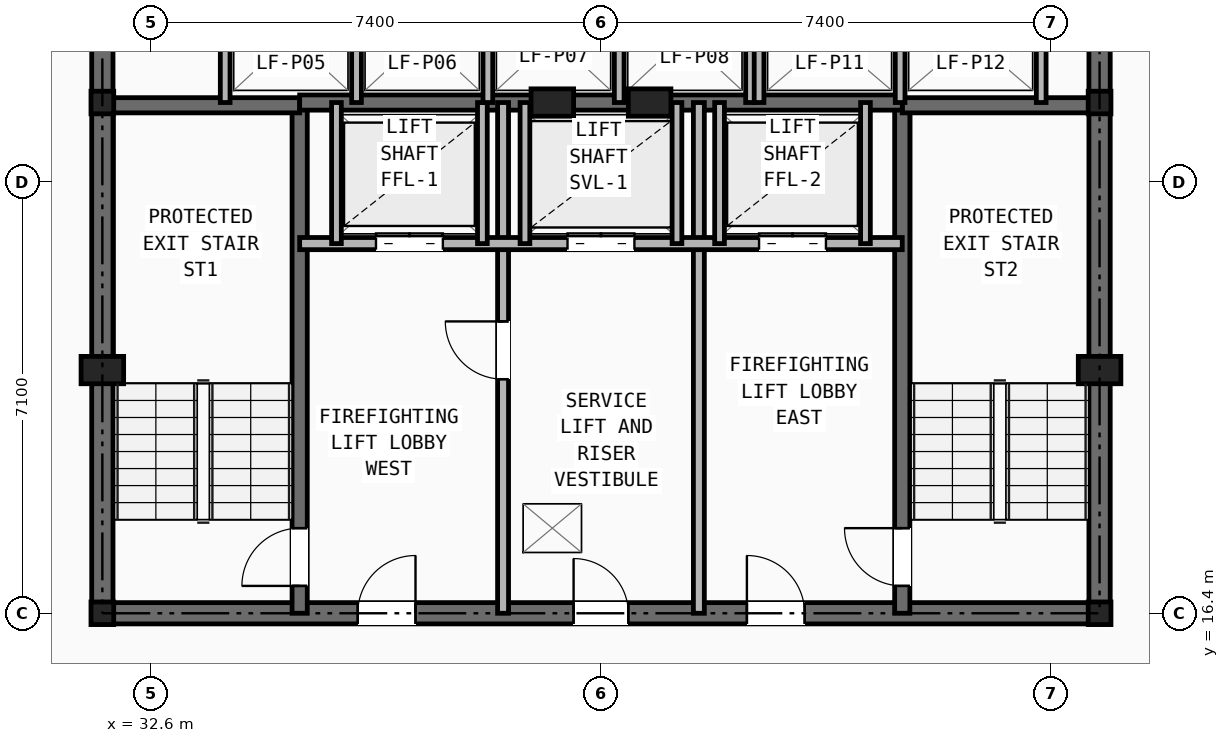
"""IFC4 building model, lengths in metres.
Left out: names, types, materials, properties, quantities, classifications, styles, units other than length and angle.
Written with IfcOpenShell. Run it as: python <this file> out.ifc"""

import sys

from ifc_helpers import new_model, si_unit, direction, frame, frame_2d, origin, origin_2d, place, context, subcontext, project, spatial, rectangle, i_section, extrude, element, fill, save


model = new_model("IFC4")
c1 = context("Model", 3, precision=1e-05, world=origin(), true_north=direction((0.0, 1.0)))
c2 = subcontext(c1, "Body", "Model", "MODEL_VIEW")
j1 = project(units=[si_unit("LENGTHUNIT", "METRE"), si_unit("PLANEANGLEUNIT", "RADIAN")], contexts=[c1])
p1 = place(None, origin())
s1 = spatial("IfcSite", under=j1, at=p1, CompositionType="ELEMENT")
p2 = place(p1, origin())
s2 = spatial("IfcBuilding", under=s1, at=p2, CompositionType="ELEMENT")
p3 = place(p2, frame((0.0, 0.0, 40.0)))
s3 = spatial("IfcBuildingStorey", under=s2, at=p3, CompositionType="ELEMENT", Elevation=40.0)
for number, where, z_axis, x_axis in (
    (1, (31.8, 16.4, 0.0), (0.0, 0.0, 1.0), (1.0, 0.0, 0.0)),
    (2, (48.2, 16.4, 0.0), (0.0, 0.0, 1.0), (1.0, 0.0, 0.0)),
    (3, (31.8, 24.8, 0.0), (0.0, 0.0, 1.0), (1.0, 0.0, 0.0)),
    (4, (48.2, 24.8, 0.0), (0.0, 0.0, 1.0), (1.0, 0.0, 0.0)),
):
    element("IfcColumn", number, at=place(p3, frame(where, z_axis=z_axis, x_axis=x_axis)), inside=s3, PredefinedType="COLUMN", context=c2, shape_type="SweptSolid", body=[
        extrude(i_section(OverallWidth=0.374, OverallDepth=0.372, WebThickness=0.016, FlangeThickness=0.026, at=origin_2d()), origin(), (0.0, 0.0, 1.0), 3.2),
    ])
for number, where, z_axis, x_axis in (
    (5, (31.8, 20.4, 0.0), (0.0, 0.0, 1.0), (1.0, 0.0, 0.0)),
    (6, (48.2, 20.4, 0.0), (0.0, 0.0, 1.0), (1.0, 0.0, 0.0)),
    (7, (39.2, 24.8, 0.0), (0.0, 0.0, 1.0), (1.0, 0.0, 0.0)),
    (8, (40.8, 24.8, 0.0), (0.0, 0.0, 1.0), (1.0, 0.0, 0.0)),
):
    element("IfcColumn", number, at=place(p3, frame(where, z_axis=z_axis, x_axis=x_axis)), inside=s3, PredefinedType="PILASTER", context=c2, shape_type="SweptSolid", body=[
        extrude(rectangle(XDim=0.7, YDim=0.45, at=origin_2d()), origin(), (0.0, 0.0, 1.0), 3.2),
    ])
p4 = place(p3, frame((31.8, 16.4, 0.0), z_axis=(0.0, 0.0, 1.0), x_axis=(1.0, 0.0, 0.0)))
e9 = element("IfcWall", 9, at=p4, inside=s3, PredefinedType="SHEAR", context=c2, shape_type="SweptSolid", body=[
    extrude(rectangle(XDim=16.4, YDim=0.35, at=frame_2d((8.2, 0.0))), origin(), (0.0, 0.0, 1.0), 2.98),
])
p5 = place(p4, frame((7.75, 0.0, 0.0)))
e10 = element("IfcOpeningElement", 10, at=p5, cuts=e9, PredefinedType="OPENING", context=c2, shape_type="SweptSolid", body=[
    extrude(rectangle(XDim=0.9, YDim=2.1, at=frame_2d((0.45, 1.05))), frame((0.0, 0.185, 0.0), z_axis=(0.0, -1.0, 0.0), x_axis=(1.0, 0.0, 0.0)), (0.0, 0.0, 1.0), 0.37),
])
p6 = place(p4, frame((4.2, 0.0, 0.0)))
e11 = element("IfcOpeningElement", 11, at=p6, cuts=e9, PredefinedType="OPENING", context=c2, shape_type="SweptSolid", body=[
    extrude(rectangle(XDim=0.95, YDim=2.1, at=frame_2d((0.475, 1.05))), frame((0.0, 0.185, 0.0), z_axis=(0.0, -1.0, 0.0), x_axis=(1.0, 0.0, 0.0)), (0.0, 0.0, 1.0), 0.37),
])
p7 = place(p4, frame((10.6, 0.0, 0.0)))
e12 = element("IfcOpeningElement", 12, at=p7, cuts=e9, PredefinedType="OPENING", context=c2, shape_type="SweptSolid", body=[
    extrude(rectangle(XDim=0.95, YDim=2.1, at=frame_2d((0.475, 1.05))), frame((0.0, 0.185, 0.0), z_axis=(0.0, -1.0, 0.0), x_axis=(1.0, 0.0, 0.0)), (0.0, 0.0, 1.0), 0.37),
])
p8 = place(p3, frame((31.8, 16.4, 0.0), z_axis=(0.0, 0.0, 1.0), x_axis=(0.0, 1.0, 0.0)))
e13 = element("IfcWall", 13, at=p8, inside=s3, PredefinedType="SHEAR", context=c2, shape_type="SweptSolid", body=[
    extrude(rectangle(XDim=14.8, YDim=0.35, at=frame_2d((7.4, 0.0))), origin(), (0.0, 0.0, 1.0), 2.98),
])
p9 = place(p8, frame((11.0, 0.0, 0.0)))
e14 = element("IfcOpeningElement", 14, at=p9, cuts=e13, PredefinedType="OPENING", context=c2, shape_type="SweptSolid", body=[
    extrude(rectangle(XDim=1.1, YDim=2.15, at=frame_2d((0.55, 1.075))), frame((0.0, 0.185, 0.0), z_axis=(0.0, -1.0, 0.0), x_axis=(1.0, 0.0, 0.0)), (0.0, 0.0, 1.0), 0.37),
])
p10 = place(p3, frame((48.2, 16.4, 0.0), z_axis=(0.0, 0.0, 1.0), x_axis=(0.0, 1.0, 0.0)))
e15 = element("IfcWall", 15, at=p10, inside=s3, PredefinedType="SHEAR", context=c2, shape_type="SweptSolid", body=[
    extrude(rectangle(XDim=14.8, YDim=0.35, at=frame_2d((7.4, 0.0))), origin(), (0.0, 0.0, 1.0), 2.98),
])
p11 = place(p10, frame((11.0, 0.0, 0.0)))
e16 = element("IfcOpeningElement", 16, at=p11, cuts=e15, PredefinedType="OPENING", context=c2, shape_type="SweptSolid", body=[
    extrude(rectangle(XDim=1.1, YDim=2.15, at=frame_2d((0.55, 1.075))), frame((0.0, 0.185, 0.0), z_axis=(0.0, -1.0, 0.0), x_axis=(1.0, 0.0, 0.0)), (0.0, 0.0, 1.0), 0.37),
])
p12 = place(p3, frame((35.045, 16.4, 0.0), z_axis=(0.0, 0.0, 1.0), x_axis=(0.0, 1.0, 0.0)))
e17 = element("IfcWall", 17, at=p12, inside=s3, PredefinedType="SHEAR", context=c2, shape_type="SweptSolid", body=[
    extrude(rectangle(XDim=8.4, YDim=0.25, at=frame_2d((4.2, 0.0))), origin(), (0.0, 0.0, 1.0), 2.98),
])
p13 = place(p12, frame((0.45, 0.0, 0.0)))
e18 = element("IfcOpeningElement", 18, at=p13, cuts=e17, PredefinedType="OPENING", context=c2, shape_type="SweptSolid", body=[
    extrude(rectangle(XDim=0.95, YDim=2.1, at=frame_2d((0.475, 1.05))), frame((0.0, 0.135, 0.0), z_axis=(0.0, -1.0, 0.0), x_axis=(1.0, 0.0, 0.0)), (0.0, 0.0, 1.0), 0.27),
])
p14 = place(p3, frame((31.8, 24.755, 0.0), z_axis=(0.0, 0.0, 1.0), x_axis=(1.0, 0.0, 0.0)))
e19 = element("IfcWall", 19, at=p14, inside=s3, PredefinedType="SHEAR", context=c2, shape_type="SweptSolid", body=[
    extrude(rectangle(XDim=3.245, YDim=0.25, at=frame_2d((1.623, 0.0))), origin(), (0.0, 0.0, 1.0), 2.98),
])
p15 = place(p3, frame((44.955, 16.4, 0.0), z_axis=(0.0, 0.0, 1.0), x_axis=(0.0, 1.0, 0.0)))
e20 = element("IfcWall", 20, at=p15, inside=s3, PredefinedType="SHEAR", context=c2, shape_type="SweptSolid", body=[
    extrude(rectangle(XDim=8.4, YDim=0.25, at=frame_2d((4.2, 0.0))), origin(), (0.0, 0.0, 1.0), 2.98),
])
p16 = place(p15, frame((0.45, 0.0, 0.0)))
e21 = element("IfcOpeningElement", 21, at=p16, cuts=e20, PredefinedType="OPENING", context=c2, shape_type="SweptSolid", body=[
    extrude(rectangle(XDim=0.95, YDim=2.1, at=frame_2d((0.475, 1.05))), frame((0.0, 0.135, 0.0), z_axis=(0.0, -1.0, 0.0), x_axis=(1.0, 0.0, 0.0)), (0.0, 0.0, 1.0), 0.27),
])
p17 = place(p3, frame((44.955, 24.755, 0.0), z_axis=(0.0, 0.0, 1.0), x_axis=(1.0, 0.0, 0.0)))
e22 = element("IfcWall", 22, at=p17, inside=s3, PredefinedType="SHEAR", context=c2, shape_type="SweptSolid", body=[
    extrude(rectangle(XDim=3.245, YDim=0.25, at=frame_2d((1.623, 0.0))), origin(), (0.0, 0.0, 1.0), 2.98),
])
p18 = place(p3, frame((35.045, 24.8, 0.0), z_axis=(0.0, 0.0, 1.0), x_axis=(1.0, 0.0, 0.0)))
e23 = element("IfcWall", 23, at=p18, inside=s3, PredefinedType="SHEAR", context=c2, shape_type="SweptSolid", body=[
    extrude(rectangle(XDim=9.91, YDim=0.25, at=frame_2d((4.955, 0.0))), origin(), (0.0, 0.0, 1.0), 2.98),
])
p19 = place(p3, frame((38.39, 16.4, 0.0), z_axis=(0.0, 0.0, 1.0), x_axis=(0.0, 1.0, 0.0)))
e24 = element("IfcWall", 24, at=p19, inside=s3, PredefinedType="PARTITIONING", context=c2, shape_type="SweptSolid", body=[
    extrude(rectangle(XDim=8.4, YDim=0.18, at=frame_2d((4.2, 0.0))), origin(), (0.0, 0.0, 1.0), 2.708),
])
p20 = place(p19, frame((3.85, 0.0, 0.0)))
e25 = element("IfcOpeningElement", 25, at=p20, cuts=e24, PredefinedType="OPENING", context=c2, shape_type="SweptSolid", body=[
    extrude(rectangle(XDim=0.95, YDim=2.1, at=frame_2d((0.475, 1.05))), frame((0.0, 0.1, 0.0), z_axis=(0.0, -1.0, 0.0), x_axis=(1.0, 0.0, 0.0)), (0.0, 0.0, 1.0), 0.2),
])
p21 = place(p3, frame((41.61, 16.4, 0.0), z_axis=(0.0, 0.0, 1.0), x_axis=(0.0, 1.0, 0.0)))
e26 = element("IfcWall", 26, at=p21, inside=s3, PredefinedType="PARTITIONING", context=c2, shape_type="SweptSolid", body=[
    extrude(rectangle(XDim=8.4, YDim=0.18, at=frame_2d((4.2, 0.0))), origin(), (0.0, 0.0, 1.0), 2.708),
])
p22 = place(p3, frame((35.045, 22.48, 0.0), z_axis=(0.0, 0.0, 1.0), x_axis=(1.0, 0.0, 0.0)))
e27 = element("IfcWall", 27, at=p22, inside=s3, PredefinedType="SOLIDWALL", context=c2, shape_type="SweptSolid", body=[
    extrude(rectangle(XDim=9.91, YDim=0.2, at=frame_2d((4.955, 0.0))), origin(), (0.0, 0.0, 1.0), 2.98),
])
p23 = place(p22, frame((1.255, 0.0, 0.0)))
e28 = element("IfcOpeningElement", 28, at=p23, cuts=e27, PredefinedType="OPENING", context=c2, shape_type="SweptSolid", body=[
    extrude(rectangle(XDim=1.1, YDim=2.15, at=frame_2d((0.55, 1.075))), frame((0.0, 0.11, 0.0), z_axis=(0.0, -1.0, 0.0), x_axis=(1.0, 0.0, 0.0)), (0.0, 0.0, 1.0), 0.22),
])
p24 = place(p22, frame((7.555, 0.0, 0.0)))
e29 = element("IfcOpeningElement", 29, at=p24, cuts=e27, PredefinedType="OPENING", context=c2, shape_type="SweptSolid", body=[
    extrude(rectangle(XDim=1.1, YDim=2.15, at=frame_2d((0.55, 1.075))), frame((0.0, 0.11, 0.0), z_axis=(0.0, -1.0, 0.0), x_axis=(1.0, 0.0, 0.0)), (0.0, 0.0, 1.0), 0.22),
])
p25 = place(p22, frame((4.405, 0.0, 0.0)))
e30 = element("IfcOpeningElement", 30, at=p25, cuts=e27, PredefinedType="OPENING", context=c2, shape_type="SweptSolid", body=[
    extrude(rectangle(XDim=1.1, YDim=2.15, at=frame_2d((0.55, 1.075))), frame((0.0, 0.11, 0.0), z_axis=(0.0, -1.0, 0.0), x_axis=(1.0, 0.0, 0.0)), (0.0, 0.0, 1.0), 0.22),
])
for number, where, z_axis, x_axis in (
    (31, (35.65, 22.48, 0.0), (0.0, 0.0, 1.0), (0.0, 1.0, 0.0)),
    (32, (38.05, 22.48, 0.0), (0.0, 0.0, 1.0), (0.0, 1.0, 0.0)),
    (33, (41.95, 22.48, 0.0), (0.0, 0.0, 1.0), (0.0, 1.0, 0.0)),
    (34, (44.35, 22.48, 0.0), (0.0, 0.0, 1.0), (0.0, 1.0, 0.0)),
    (35, (38.75, 22.48, 0.0), (0.0, 0.0, 1.0), (0.0, 1.0, 0.0)),
    (36, (41.25, 22.48, 0.0), (0.0, 0.0, 1.0), (0.0, 1.0, 0.0)),
):
    element("IfcWall", number, at=place(p3, frame(where, z_axis=z_axis, x_axis=x_axis)), inside=s3, PredefinedType="SOLIDWALL", context=c2, shape_type="SweptSolid", body=[
        extrude(rectangle(XDim=2.32, YDim=0.16, at=frame_2d((1.16, 0.0))), origin(), (0.0, 0.0, 1.0), 2.98),
    ])
for number, where, z_axis, x_axis in (
    (37, (33.82, 24.8, 0.0), (0.0, 0.0, 1.0), (0.0, 1.0, 0.0)),
    (38, (35.98, 24.8, 0.0), (0.0, 0.0, 1.0), (0.0, 1.0, 0.0)),
    (39, (38.14, 24.8, 0.0), (0.0, 0.0, 1.0), (0.0, 1.0, 0.0)),
    (40, (40.3, 24.8, 0.0), (0.0, 0.0, 1.0), (0.0, 1.0, 0.0)),
    (41, (42.46, 24.8, 0.0), (0.0, 0.0, 1.0), (0.0, 1.0, 0.0)),
    (42, (42.6, 24.8, 0.0), (0.0, 0.0, 1.0), (0.0, 1.0, 0.0)),
    (43, (44.92, 24.8, 0.0), (0.0, 0.0, 1.0), (0.0, 1.0, 0.0)),
    (44, (47.24, 24.8, 0.0), (0.0, 0.0, 1.0), (0.0, 1.0, 0.0)),
):
    element("IfcWall", number, at=place(p3, frame(where, z_axis=z_axis, x_axis=x_axis)), inside=s3, PredefinedType="SOLIDWALL", context=c2, shape_type="SweptSolid", body=[
        extrude(rectangle(XDim=2.08, YDim=0.16, at=frame_2d((1.04, 0.0))), origin(), (0.0, 0.0, 1.0), 2.98),
    ])
p26 = place(p5, origin())
e45 = element("IfcDoor", 45, at=p26, inside=s3, OperationType="SINGLE_SWING_LEFT", PredefinedType="DOOR", context=c2, shape_type="SweptSolid", body=[
    extrude(rectangle(XDim=0.9, YDim=2.1, at=frame_2d((0.45, 1.05))), frame((0.0, 0.025, 0.0), z_axis=(0.0, -1.0, 0.0), x_axis=(1.0, 0.0, 0.0)), (0.0, 0.0, 1.0), 0.05),
])
fill(e10, e45)
p27 = place(p20, origin())
e46 = element("IfcDoor", 46, at=p27, inside=s3, OperationType="SINGLE_SWING_RIGHT", PredefinedType="DOOR", context=c2, shape_type="SweptSolid", body=[
    extrude(rectangle(XDim=0.95, YDim=2.1, at=frame_2d((0.475, 1.05))), frame((0.0, 0.025, 0.0), z_axis=(0.0, -1.0, 0.0), x_axis=(1.0, 0.0, 0.0)), (0.0, 0.0, 1.0), 0.05),
])
fill(e25, e46)
p28 = place(p13, origin())
e47 = element("IfcDoor", 47, at=p28, inside=s3, OperationType="SINGLE_SWING_LEFT", PredefinedType="DOOR", context=c2, shape_type="SweptSolid", body=[
    extrude(rectangle(XDim=0.95, YDim=2.1, at=frame_2d((0.475, 1.05))), frame((0.0, 0.025, 0.0), z_axis=(0.0, -1.0, 0.0), x_axis=(1.0, 0.0, 0.0)), (0.0, 0.0, 1.0), 0.05),
])
fill(e18, e47)
p29 = place(p16, origin())
e48 = element("IfcDoor", 48, at=p29, inside=s3, OperationType="SINGLE_SWING_RIGHT", PredefinedType="DOOR", context=c2, shape_type="SweptSolid", body=[
    extrude(rectangle(XDim=0.95, YDim=2.1, at=frame_2d((0.475, 1.05))), frame((0.0, 0.025, 0.0), z_axis=(0.0, -1.0, 0.0), x_axis=(1.0, 0.0, 0.0)), (0.0, 0.0, 1.0), 0.05),
])
fill(e21, e48)
p30 = place(p6, origin())
e49 = element("IfcDoor", 49, at=p30, inside=s3, OperationType="SINGLE_SWING_RIGHT", PredefinedType="DOOR", context=c2, shape_type="SweptSolid", body=[
    extrude(rectangle(XDim=0.95, YDim=2.1, at=frame_2d((0.475, 1.05))), frame((0.0, 0.025, 0.0), z_axis=(0.0, -1.0, 0.0), x_axis=(1.0, 0.0, 0.0)), (0.0, 0.0, 1.0), 0.05),
])
fill(e11, e49)
p31 = place(p7, origin())
e50 = element("IfcDoor", 50, at=p31, inside=s3, OperationType="SINGLE_SWING_LEFT", PredefinedType="DOOR", context=c2, shape_type="SweptSolid", body=[
    extrude(rectangle(XDim=0.95, YDim=2.1, at=frame_2d((0.475, 1.05))), frame((0.0, 0.025, 0.0), z_axis=(0.0, -1.0, 0.0), x_axis=(1.0, 0.0, 0.0)), (0.0, 0.0, 1.0), 0.05),
])
fill(e12, e50)
p32 = place(p23, origin())
e51 = element("IfcDoor", 51, at=p32, inside=s3, OperationType="DOUBLE_DOOR_SLIDING", PredefinedType="DOOR", context=c2, shape_type="SweptSolid", body=[
    extrude(rectangle(XDim=1.1, YDim=2.15, at=frame_2d((0.55, 1.075))), frame((0.0, 0.025, 0.0), z_axis=(0.0, -1.0, 0.0), x_axis=(1.0, 0.0, 0.0)), (0.0, 0.0, 1.0), 0.05),
])
fill(e28, e51)
p33 = place(p24, origin())
e52 = element("IfcDoor", 52, at=p33, inside=s3, OperationType="DOUBLE_DOOR_SLIDING", PredefinedType="DOOR", context=c2, shape_type="SweptSolid", body=[
    extrude(rectangle(XDim=1.1, YDim=2.15, at=frame_2d((0.55, 1.075))), frame((0.0, 0.025, 0.0), z_axis=(0.0, -1.0, 0.0), x_axis=(1.0, 0.0, 0.0)), (0.0, 0.0, 1.0), 0.05),
])
fill(e29, e52)
p34 = place(p25, origin())
e53 = element("IfcDoor", 53, at=p34, inside=s3, OperationType="DOUBLE_DOOR_SLIDING", PredefinedType="DOOR", context=c2, shape_type="SweptSolid", body=[
    extrude(rectangle(XDim=1.1, YDim=2.15, at=frame_2d((0.55, 1.075))), frame((0.0, 0.025, 0.0), z_axis=(0.0, -1.0, 0.0), x_axis=(1.0, 0.0, 0.0)), (0.0, 0.0, 1.0), 0.05),
])
fill(e30, e53)
save(model, sys.argv[1])
